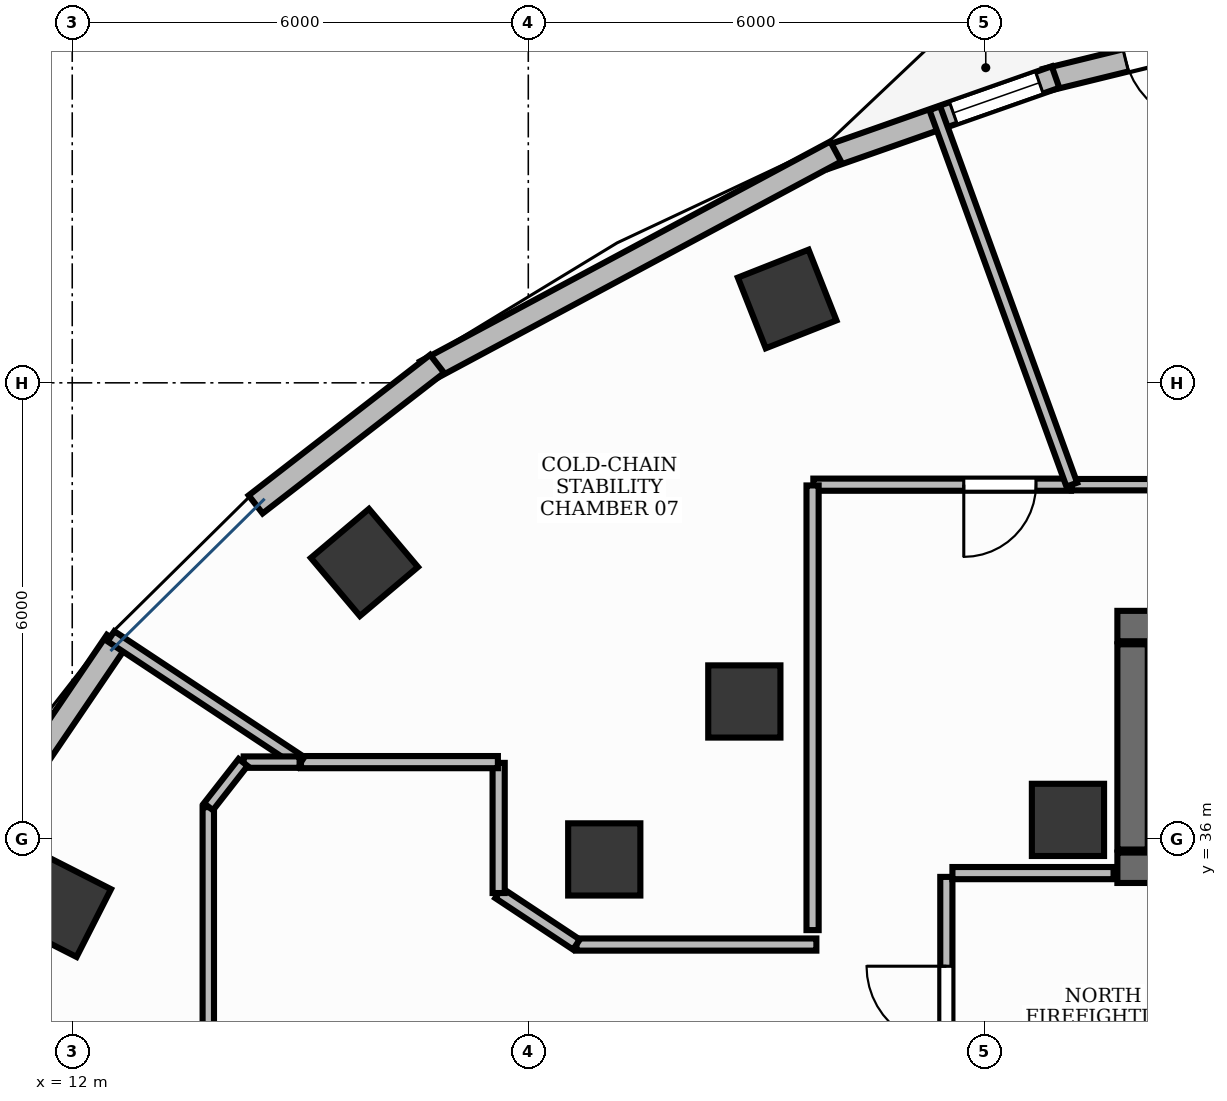
"""IFC4 building model, lengths in metres.
Left out: names, types, materials, properties, quantities, classifications, styles, units other than length and angle.
Written with IfcOpenShell. Run it as: python <this file> out.ifc"""

import sys

from ifc_helpers import new_model, si_unit, direction, frame, frame_2d, origin, origin_2d, place, context, subcontext, project, spatial, rectangle, extrude, element, fill, save


model = new_model("IFC4")
c1 = context("Model", 3, precision=1e-05, world=origin(), true_north=direction((0.0, 1.0)))
c2 = subcontext(c1, "Body", "Model", "MODEL_VIEW")
j1 = project(units=[si_unit("LENGTHUNIT", "METRE"), si_unit("PLANEANGLEUNIT", "RADIAN")], contexts=[c1])
p1 = place(None, origin())
s1 = spatial("IfcSite", under=j1, at=p1, CompositionType="ELEMENT")
p2 = place(p1, origin())
s2 = spatial("IfcBuilding", under=s1, at=p2, CompositionType="ELEMENT")
p3 = place(p2, frame((0.0, 0.0, 171.0)))
s3 = spatial("IfcBuildingStorey", under=s2, at=p3, CompositionType="ELEMENT", Elevation=171.0)
p4 = place(p3, frame((25.75, 38.8, 0.0), z_axis=(0.0, 0.0, 1.0), x_axis=(1.0, 0.0, 0.0)))
e1 = element("IfcWall", 1, at=p4, inside=s3, PredefinedType="SHEAR", context=c2, shape_type="SweptSolid", body=[
    extrude(rectangle(XDim=3.1, YDim=0.4, at=frame_2d((1.55, 0.0))), origin(), (0.0, 0.0, 1.0), 3.9),
])
p5 = place(p3, frame((25.75, 35.62, 0.0), z_axis=(0.0, 0.0, 1.0), x_axis=(1.0, 0.0, 0.0)))
e2 = element("IfcWall", 2, at=p5, inside=s3, PredefinedType="SHEAR", context=c2, shape_type="SweptSolid", body=[
    extrude(rectangle(XDim=3.1, YDim=0.4, at=frame_2d((1.55, 0.0))), origin(), (0.0, 0.0, 1.0), 3.9),
])
p6 = place(p5, frame((0.9, 0.0, 0.0)))
e3 = element("IfcOpeningElement", 3, at=p6, cuts=e2, PredefinedType="OPENING", context=c2, shape_type="SweptSolid", body=[
    extrude(rectangle(XDim=1.3, YDim=2.2, at=frame_2d((0.65, 1.1))), frame((0.0, 0.215, 0.0), z_axis=(0.0, -1.0, 0.0), x_axis=(1.0, 0.0, 0.0)), (0.0, 0.0, 1.0), 0.43),
])
p7 = place(p3, frame((25.95, 35.86, 0.0), z_axis=(0.0, 0.0, 1.0), x_axis=(0.0, 1.0, 0.0)))
e4 = element("IfcWall", 4, at=p7, inside=s3, PredefinedType="SHEAR", context=c2, shape_type="SweptSolid", body=[
    extrude(rectangle(XDim=2.7, YDim=0.4, at=frame_2d((1.35, 0.0))), origin(), (0.0, 0.0, 1.0), 3.9),
])
p8 = place(p3, frame((25.1, 36.25, -0.0), z_axis=(0.0, 0.0, 1.0), x_axis=(1.0, 0.0, 0.0)))
e5 = element("IfcColumn", 5, at=p8, inside=s3, PredefinedType="PILASTER", context=c2, shape_type="SweptSolid", body=[
    extrude(rectangle(XDim=0.95, YDim=0.95, at=origin_2d()), origin(), (0.0, 0.0, 1.0), 3.901),
])
for number, where, z_axis, x_axis in (
    (6, (21.406, 43.103, -0.0), (0.0, 0.0, 1.0), (0.93, 0.367, 0.0)),
    (7, (15.844, 39.637, -0.0), (0.0, 0.0, 1.0), (0.764, 0.645, 0.0)),
):
    element("IfcColumn", number, at=place(p3, frame(where, z_axis=z_axis, x_axis=x_axis)), inside=s3, PredefinedType="COLUMN", context=c2, shape_type="SweptSolid", body=[
        extrude(rectangle(XDim=1.0, YDim=1.0, at=origin_2d()), origin(), (0.0, 0.0, 1.0), 3.901),
    ])
p9 = place(p3, frame((20.842, 37.808, -0.0), z_axis=(0.0, 0.0, 1.0), x_axis=(1.0, 0.0, 0.0)))
e8 = element("IfcColumn", 8, at=p9, inside=s3, PredefinedType="COLUMN", context=c2, shape_type="SweptSolid", body=[
    extrude(rectangle(XDim=0.95, YDim=0.95, at=origin_2d()), origin(), (0.0, 0.0, 1.0), 3.901),
])
p10 = place(p3, frame((11.838, 35.119, -0.0), z_axis=(0.0, 0.0, 1.0), x_axis=(0.453057191132, 0.891481453292, 0.0)))
e9 = element("IfcColumn", 9, at=p10, inside=s3, PredefinedType="COLUMN", context=c2, shape_type="SweptSolid", body=[
    extrude(rectangle(XDim=1.0, YDim=1.0, at=origin_2d()), origin(), (0.0, 0.0, 1.0), 3.901),
])
p11 = place(p3, frame((19.0, 35.73, -0.0), z_axis=(0.0, 0.0, 1.0), x_axis=(1.0, 0.0, 0.0)))
e10 = element("IfcColumn", 10, at=p11, inside=s3, PredefinedType="COLUMN", context=c2, shape_type="SweptSolid", body=[
    extrude(rectangle(XDim=0.95, YDim=0.95, at=origin_2d()), origin(), (0.0, 0.0, 1.0), 3.901),
])
p12 = place(p3, frame((27.982, 46.762, 0.0), z_axis=(0.0, 0.0, 1.0), x_axis=(-0.971312804689, -0.237805457142, 0.0)))
e11 = element("IfcWall", 11, at=p12, inside=s3, PredefinedType="STANDARD", context=c2, shape_type="SweptSolid", body=[
    extrude(rectangle(XDim=3.269, YDim=0.3, at=frame_2d((1.634, 0.0))), origin(), (0.0, 0.0, 1.0), 3.9),
])
p13 = place(p12, frame((1.084, 0.0, 0.0)))
e12 = element("IfcOpeningElement", 12, at=p13, cuts=e11, PredefinedType="OPENING", context=c2, shape_type="SweptSolid", body=[
    extrude(rectangle(XDim=1.1, YDim=2.15, at=frame_2d((0.55, 1.075))), frame((0.0, 0.165, 0.0), z_axis=(0.0, -1.0, 0.0), x_axis=(1.0, 0.0, 0.0)), (0.0, 0.0, 1.0), 0.33),
])
p14 = place(p3, frame((24.937, 46.023, 0.0), z_axis=(0.0, 0.0, 1.0), x_axis=(-0.943495444321, -0.331385495377, 0.0)))
e13 = element("IfcWall", 13, at=p14, inside=s3, PredefinedType="STANDARD", context=c2, shape_type="SweptSolid", body=[
    extrude(rectangle(XDim=3.214, YDim=0.3, at=frame_2d((1.607, 0.0))), origin(), (0.0, 0.0, 1.0), 3.9),
])
p15 = place(p14, frame((0.226, 0.0, 0.9)))
e14 = element("IfcOpeningElement", 14, at=p15, cuts=e13, PredefinedType="OPENING", context=c2, shape_type="SweptSolid", body=[
    extrude(rectangle(XDim=1.2, YDim=2.7, at=frame_2d((0.6, 1.35))), frame((0.0, 0.165, 0.0), z_axis=(0.0, -1.0, 0.0), x_axis=(1.0, 0.0, 0.0)), (0.0, 0.0, 1.0), 0.33),
])
p16 = place(p3, frame((22.044, 45.043, 0.0), z_axis=(0.0, 0.0, 1.0), x_axis=(-0.881364369565, -0.472437136624, 0.0)))
e15 = element("IfcWall", 15, at=p16, inside=s3, PredefinedType="STANDARD", context=c2, shape_type="SweptSolid", body=[
    extrude(rectangle(XDim=6.124, YDim=0.3, at=frame_2d((3.062, 0.0))), origin(), (0.0, 0.0, 1.0), 3.47),
])
p17 = place(p3, frame((16.8, 42.25, 0.0), z_axis=(0.0, 0.0, 1.0), x_axis=(-0.790530517055, -0.612422649488, 0.0)))
e16 = element("IfcWall", 16, at=p17, inside=s3, PredefinedType="STANDARD", context=c2, shape_type="SweptSolid", body=[
    extrude(rectangle(XDim=3.02, YDim=0.3, at=frame_2d((1.51, 0.0))), origin(), (0.0, 0.0, 1.0), 3.47),
])
p18 = place(p3, frame((12.58, 38.601, 0.0), z_axis=(0.0, 0.0, 1.0), x_axis=(-0.561663900064, -0.827365495634, 0.0)))
e17 = element("IfcWall", 17, at=p18, inside=s3, PredefinedType="STANDARD", context=c2, shape_type="SweptSolid", body=[
    extrude(rectangle(XDim=5.438, YDim=0.3, at=frame_2d((2.719, 0.0))), origin(), (0.0, 0.0, 1.0), 3.9),
])
p19 = place(p3, frame((23.5, 32.1, 0.0), z_axis=(0.0, 0.0, 1.0), x_axis=(0.0, 1.0, 0.0)))
e18 = element("IfcWall", 18, at=p19, inside=s3, PredefinedType="PARTITIONING", context=c2, shape_type="SweptSolid", body=[
    extrude(rectangle(XDim=3.4, YDim=0.16, at=frame_2d((1.7, 0.0))), origin(), (0.0, 0.0, 1.0), 2.91),
])
p20 = place(p19, frame((1.175, 0.0, 0.0)))
e19 = element("IfcOpeningElement", 19, at=p20, cuts=e18, PredefinedType="OPENING", context=c2, shape_type="SweptSolid", body=[
    extrude(rectangle(XDim=1.05, YDim=2.15, at=frame_2d((0.525, 1.075))), frame((0.0, 0.095, 0.0), z_axis=(0.0, -1.0, 0.0), x_axis=(1.0, 0.0, 0.0)), (0.0, 0.0, 1.0), 0.19),
])
p21 = place(p3, frame((23.58, 35.55, 0.0), z_axis=(0.0, 0.0, 1.0), x_axis=(1.0, 0.0, 0.0)))
e20 = element("IfcWall", 20, at=p21, inside=s3, PredefinedType="PARTITIONING", context=c2, shape_type="SweptSolid", body=[
    extrude(rectangle(XDim=2.12, YDim=0.16, at=frame_2d((1.06, 0.0))), origin(), (0.0, 0.0, 1.0), 2.91),
])
p22 = place(p3, frame((34.059, 40.66, 0.0), z_axis=(0.0, 0.0, 1.0), x_axis=(-1.0, 0.0, 0.0)))
e21 = element("IfcWall", 21, at=p22, inside=s3, PredefinedType="PARTITIONING", context=c2, shape_type="SweptSolid", body=[
    extrude(rectangle(XDim=8.908, YDim=0.15, at=frame_2d((4.454, 0.0))), origin(), (0.0, 0.0, 1.0), 2.91),
])
p23 = place(p22, frame((0.24, 0.0, 0.0)))
e22 = element("IfcOpeningElement", 22, at=p23, cuts=e21, PredefinedType="OPENING", context=c2, shape_type="SweptSolid", body=[
    extrude(rectangle(XDim=0.95, YDim=2.15, at=frame_2d((0.475, 1.075))), frame((0.0, 0.09, 0.0), z_axis=(0.0, -1.0, 0.0), x_axis=(1.0, 0.0, 0.0)), (0.0, 0.0, 1.0), 0.18),
])
p24 = place(p3, frame((25.14, 40.66, 0.0), z_axis=(0.0, 0.0, 1.0), x_axis=(-1.0, 0.0, 0.0)))
e23 = element("IfcWall", 23, at=p24, inside=s3, PredefinedType="PARTITIONING", context=c2, shape_type="SweptSolid", body=[
    extrude(rectangle(XDim=3.39, YDim=0.16, at=frame_2d((1.695, 0.0))), origin(), (0.0, 0.0, 1.0), 2.91),
])
p25 = place(p24, frame((0.461, 0.0, 0.0)))
e24 = element("IfcOpeningElement", 24, at=p25, cuts=e23, PredefinedType="OPENING", context=c2, shape_type="SweptSolid", body=[
    extrude(rectangle(XDim=0.95, YDim=2.15, at=frame_2d((0.475, 1.075))), frame((0.0, 0.095, 0.0), z_axis=(0.0, -1.0, 0.0), x_axis=(1.0, 0.0, 0.0)), (0.0, 0.0, 1.0), 0.19),
])
p26 = place(p3, frame((13.79, 36.417, 0.0), z_axis=(0.0, 0.0, 1.0), x_axis=(0.0, -1.0, 0.0)))
e25 = element("IfcWall", 25, at=p26, inside=s3, PredefinedType="PARTITIONING", context=c2, shape_type="SweptSolid", body=[
    extrude(rectangle(XDim=4.208, YDim=0.15, at=frame_2d((2.104, 0.0))), origin(), (0.0, 0.0, 1.0), 2.91),
])
p27 = place(p26, frame((3.017, 0.0, 0.0)))
e26 = element("IfcOpeningElement", 26, at=p27, cuts=e25, PredefinedType="OPENING", context=c2, shape_type="SweptSolid", body=[
    extrude(rectangle(XDim=0.95, YDim=2.15, at=frame_2d((0.475, 1.075))), frame((0.0, 0.09, 0.0), z_axis=(0.0, -1.0, 0.0), x_axis=(1.0, 0.0, 0.0)), (0.0, 0.0, 1.0), 0.18),
])
p28 = place(p3, frame((25.151, 40.66, 0.0), z_axis=(0.0, 0.0, 1.0), x_axis=(-0.341995928267, 0.939701433993, 0.0)))
e27 = element("IfcWall", 27, at=p28, inside=s3, PredefinedType="PARTITIONING", context=c2, shape_type="SweptSolid", body=[
    extrude(rectangle(XDim=5.271, YDim=0.15, at=frame_2d((2.636, 0.0))), origin(), (0.0, 0.0, 1.0), 2.91),
])
p29 = place(p3, frame((21.74, 40.65, 0.0), z_axis=(0.0, 0.0, 1.0), x_axis=(0.0, -1.0, 0.0)))
e28 = element("IfcWall", 28, at=p29, inside=s3, PredefinedType="PARTITIONING", context=c2, shape_type="SweptSolid", body=[
    extrude(rectangle(XDim=5.85, YDim=0.16, at=frame_2d((2.925, 0.0))), origin(), (0.0, 0.0, 1.0), 2.91),
])
p30 = place(p3, frame((21.79, 34.61, 0.0), z_axis=(0.0, 0.0, 1.0), x_axis=(-1.0, 0.0, 0.0)))
e29 = element("IfcWall", 29, at=p30, inside=s3, PredefinedType="PARTITIONING", context=c2, shape_type="SweptSolid", body=[
    extrude(rectangle(XDim=3.157, YDim=0.16, at=frame_2d((1.578, 0.0))), origin(), (0.0, 0.0, 1.0), 2.91),
])
p31 = place(p3, frame((18.633, 34.61, 0.0), z_axis=(0.0, 0.0, 1.0), x_axis=(-0.833790799357, 0.552080522123, 0.0)))
e30 = element("IfcWall", 30, at=p31, inside=s3, PredefinedType="PARTITIONING", context=c2, shape_type="SweptSolid", body=[
    extrude(rectangle(XDim=1.227, YDim=0.16, at=frame_2d((0.614, 0.0))), origin(), (0.0, 0.0, 1.0), 2.91),
])
p32 = place(p3, frame((17.61, 35.288, 0.0), z_axis=(0.0, 0.0, 1.0), x_axis=(0.0, 1.0, 0.0)))
e31 = element("IfcWall", 31, at=p32, inside=s3, PredefinedType="PARTITIONING", context=c2, shape_type="SweptSolid", body=[
    extrude(rectangle(XDim=1.712, YDim=0.16, at=frame_2d((0.856, 0.0))), origin(), (0.0, 0.0, 1.0), 2.91),
])
p33 = place(p3, frame((17.6, 37.01, 0.0), z_axis=(0.0, 0.0, 1.0), x_axis=(-1.0, 0.0, 0.0)))
e32 = element("IfcWall", 32, at=p33, inside=s3, PredefinedType="PARTITIONING", context=c2, shape_type="SweptSolid", body=[
    extrude(rectangle(XDim=2.591, YDim=0.16, at=frame_2d((1.295, 0.0))), origin(), (0.0, 0.0, 1.0), 2.91),
])
p34 = place(p3, frame((15.01, 37.01, 0.0), z_axis=(0.0, 0.0, 1.0), x_axis=(-0.833750277905, 0.552141715589, 0.0)))
e33 = element("IfcWall", 33, at=p34, inside=s3, PredefinedType="PARTITIONING", context=c2, shape_type="SweptSolid", body=[
    extrude(rectangle(XDim=2.998, YDim=0.16, at=frame_2d((1.499, 0.0))), origin(), (0.0, 0.0, 1.0), 2.91),
])
p35 = place(p3, frame((14.991, 37.01, 0.0), z_axis=(0.0, 0.0, 1.0), x_axis=(-1.0, 0.0, 0.0)))
e34 = element("IfcWall", 34, at=p35, inside=s3, PredefinedType="PARTITIONING", context=c2, shape_type="SweptSolid", body=[
    extrude(rectangle(XDim=0.736, YDim=0.15, at=frame_2d((0.368, 0.0))), origin(), (0.0, 0.0, 1.0), 2.91),
])
p36 = place(p3, frame((14.248, 37.006, 0.0), z_axis=(0.0, 0.0, 1.0), x_axis=(-0.616041172792, -0.787713954063, 0.0)))
e35 = element("IfcWall", 35, at=p36, inside=s3, PredefinedType="PARTITIONING", context=c2, shape_type="SweptSolid", body=[
    extrude(rectangle(XDim=0.74, YDim=0.15, at=frame_2d((0.37, 0.0))), origin(), (0.0, 0.0, 1.0), 2.91),
])
p37 = place(p13, origin())
e36 = element("IfcDoor", 36, at=p37, inside=s3, OperationType="SINGLE_SWING_LEFT", PredefinedType="DOOR", context=c2, shape_type="SweptSolid", body=[
    extrude(rectangle(XDim=1.1, YDim=2.15, at=frame_2d((0.55, 1.075))), frame((0.0, 0.025, 0.0), z_axis=(0.0, -1.0, 0.0), x_axis=(1.0, 0.0, 0.0)), (0.0, 0.0, 1.0), 0.05),
])
fill(e12, e36)
p38 = place(p15, origin())
e37 = element("IfcWindow", 37, at=p38, inside=s3, PartitioningType="SINGLE_PANEL", PredefinedType="WINDOW", context=c2, shape_type="SweptSolid", body=[
    extrude(rectangle(XDim=1.2, YDim=2.7, at=frame_2d((0.6, 1.35))), frame((0.0, 0.03, 0.0), z_axis=(0.0, -1.0, 0.0), x_axis=(1.0, 0.0, 0.0)), (0.0, 0.0, 1.0), 0.06),
])
fill(e14, e37)
p39 = place(p20, origin())
e38 = element("IfcDoor", 38, at=p39, inside=s3, OperationType="SINGLE_SWING_RIGHT", PredefinedType="DOOR", context=c2, shape_type="SweptSolid", body=[
    extrude(rectangle(XDim=1.05, YDim=2.15, at=frame_2d((0.525, 1.075))), frame((0.0, 0.025, 0.0), z_axis=(0.0, -1.0, 0.0), x_axis=(1.0, 0.0, 0.0)), (0.0, 0.0, 1.0), 0.05),
])
fill(e19, e38)
p40 = place(p25, origin())
e39 = element("IfcDoor", 39, at=p40, inside=s3, OperationType="SINGLE_SWING_RIGHT", PredefinedType="DOOR", context=c2, shape_type="SweptSolid", body=[
    extrude(rectangle(XDim=0.95, YDim=2.15, at=frame_2d((0.475, 1.075))), frame((0.0, 0.025, 0.0), z_axis=(0.0, -1.0, 0.0), x_axis=(1.0, 0.0, 0.0)), (0.0, 0.0, 1.0), 0.05),
])
fill(e24, e39)
save(model, sys.argv[1])
